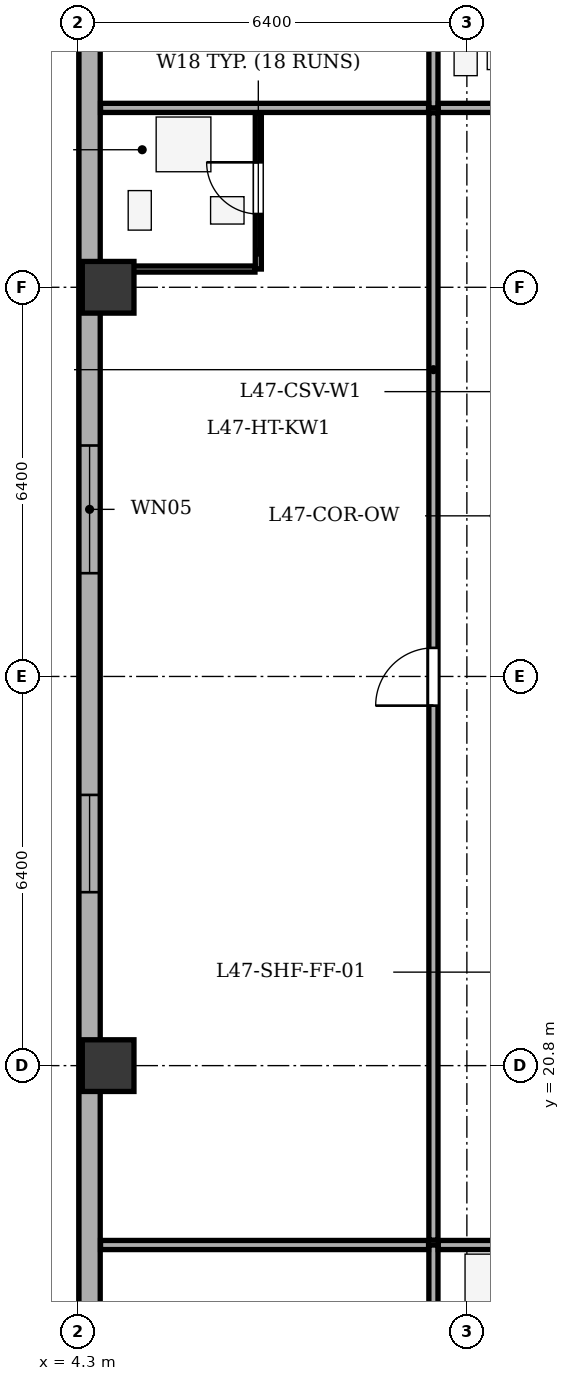
"""IFC4 building model, lengths in metres.
Left out: names, types, materials, properties, quantities, classifications, styles, units other than length and angle.
Written with IfcOpenShell. Run it as: python <this file> out.ifc"""

import sys

from ifc_helpers import new_model, si_unit, direction, frame, frame_2d, origin, origin_2d, place, context, subcontext, project, spatial, rectangle, extrude, element, fill, save


model = new_model("IFC4")
c1 = context("Model", 3, precision=1e-05, world=origin(), true_north=direction((0.0, 1.0)))
c2 = subcontext(c1, "Body", "Model", "MODEL_VIEW")
j1 = project(units=[si_unit("LENGTHUNIT", "METRE"), si_unit("PLANEANGLEUNIT", "RADIAN")], contexts=[c1])
p1 = place(None, origin())
s1 = spatial("IfcSite", under=j1, at=p1, CompositionType="ELEMENT")
p2 = place(p1, origin())
s2 = spatial("IfcBuilding", under=s1, at=p2, CompositionType="ELEMENT")
p3 = place(p2, frame((0.0, 0.0, 183.3)))
s3 = spatial("IfcBuildingStorey", under=s2, at=p3, CompositionType="ELEMENT", Elevation=183.3)
for number, where, z_axis, x_axis in (
    (1, (4.8, 20.8, 0.0), (0.0, 0.0, 1.0), (1.0, 0.0, 0.0)),
    (2, (4.8, 33.6, 0.0), (0.0, 0.0, 1.0), (1.0, 0.0, 0.0)),
):
    element("IfcColumn", number, at=place(p3, frame(where, z_axis=z_axis, x_axis=x_axis)), inside=s3, PredefinedType="COLUMN", context=c2, shape_type="SweptSolid", body=[
        extrude(rectangle(XDim=0.85, YDim=0.85, at=origin_2d()), origin(), (0.0, 0.0, 1.0), 3.5),
    ])
p4 = place(p3, frame((4.495, 12.9, 0.0), z_axis=(0.0, 0.0, 1.0), x_axis=(0.0, 1.0, 0.0)))
e3 = element("IfcWall", 3, at=p4, inside=s3, PredefinedType="STANDARD", context=c2, shape_type="SweptSolid", body=[
    extrude(rectangle(XDim=35.0, YDim=0.35, at=frame_2d((17.5, 0.0))), origin(), (0.0, 0.0, 1.0), 2.785),
])
p5 = place(p4, frame((1.813, 0.0, 0.75)))
e4 = element("IfcOpeningElement", 4, at=p5, cuts=e3, PredefinedType="OPENING", context=c2, shape_type="SweptSolid", body=[
    extrude(rectangle(XDim=1.6, YDim=1.75, at=frame_2d((0.8, 0.875))), frame((0.0, 0.185, 0.0), z_axis=(0.0, -1.0, 0.0), x_axis=(1.0, 0.0, 0.0)), (0.0, 0.0, 1.0), 0.37),
])
p6 = place(p4, frame((10.752, 0.0, 0.75)))
e5 = element("IfcOpeningElement", 5, at=p6, cuts=e3, PredefinedType="OPENING", context=c2, shape_type="SweptSolid", body=[
    extrude(rectangle(XDim=1.6, YDim=1.75, at=frame_2d((0.8, 0.875))), frame((0.0, 0.185, 0.0), z_axis=(0.0, -1.0, 0.0), x_axis=(1.0, 0.0, 0.0)), (0.0, 0.0, 1.0), 0.37),
])
p7 = place(p4, frame((15.998, 0.0, 0.75)))
e6 = element("IfcOpeningElement", 6, at=p7, cuts=e3, PredefinedType="OPENING", context=c2, shape_type="SweptSolid", body=[
    extrude(rectangle(XDim=2.1, YDim=1.75, at=frame_2d((1.05, 0.875))), frame((0.0, 0.185, 0.0), z_axis=(0.0, -1.0, 0.0), x_axis=(1.0, 0.0, 0.0)), (0.0, 0.0, 1.0), 0.37),
])
p8 = place(p4, frame((25.97, 0.0, 0.75)))
e7 = element("IfcOpeningElement", 7, at=p8, cuts=e3, PredefinedType="OPENING", context=c2, shape_type="SweptSolid", body=[
    extrude(rectangle(XDim=1.6, YDim=1.75, at=frame_2d((0.8, 0.875))), frame((0.0, 0.185, 0.0), z_axis=(0.0, -1.0, 0.0), x_axis=(1.0, 0.0, 0.0)), (0.0, 0.0, 1.0), 0.37),
])
p9 = place(p4, frame((30.555, 0.0, 0.75)))
e8 = element("IfcOpeningElement", 8, at=p9, cuts=e3, PredefinedType="OPENING", context=c2, shape_type="SweptSolid", body=[
    extrude(rectangle(XDim=2.1, YDim=1.75, at=frame_2d((1.05, 0.875))), frame((0.0, 0.185, 0.0), z_axis=(0.0, -1.0, 0.0), x_axis=(1.0, 0.0, 0.0)), (0.0, 0.0, 1.0), 0.37),
])
p10 = place(p3, frame((10.15, 8.275, 0.0), z_axis=(0.0, 0.0, 1.0), x_axis=(0.0, 1.0, 0.0)))
e9 = element("IfcWall", 9, at=p10, inside=s3, PredefinedType="PARTITIONING", context=c2, shape_type="SweptSolid", body=[
    extrude(rectangle(XDim=9.575, YDim=0.15, at=frame_2d((4.788, 0.0))), origin(), (0.0, 0.0, 1.0), 3.2),
])
p11 = place(p3, frame((10.23, 17.85, 0.0), z_axis=(0.0, 0.0, 1.0), x_axis=(1.0, 0.0, 0.0)))
e10 = element("IfcWall", 10, at=p11, inside=s3, PredefinedType="PARTITIONING", context=c2, shape_type="SweptSolid", body=[
    extrude(rectangle(XDim=1.82, YDim=0.15, at=frame_2d((0.91, 0.0))), origin(), (0.0, 0.0, 1.0), 3.2),
])
p12 = place(p3, frame((10.15, 36.55, 0.0), z_axis=(0.0, 0.0, 1.0), x_axis=(0.0, 1.0, 0.0)))
e11 = element("IfcWall", 11, at=p12, inside=s3, PredefinedType="PARTITIONING", context=c2, shape_type="SweptSolid", body=[
    extrude(rectangle(XDim=15.975, YDim=0.15, at=frame_2d((7.987, 0.0))), origin(), (0.0, 0.0, 1.0), 3.2),
])
p13 = place(p3, frame((10.23, 36.55, 0.0), z_axis=(0.0, 0.0, 1.0), x_axis=(1.0, 0.0, 0.0)))
e12 = element("IfcWall", 12, at=p13, inside=s3, PredefinedType="PARTITIONING", context=c2, shape_type="SweptSolid", body=[
    extrude(rectangle(XDim=1.57, YDim=0.15, at=frame_2d((0.785, 0.0))), origin(), (0.0, 0.0, 1.0), 3.2),
])
for number, where, z_axis, x_axis in (
    (13, (4.675, 17.85, 0.0), (0.0, 0.0, 1.0), (1.0, 0.0, 0.0)),
    (14, (4.675, 36.55, 0.0), (0.0, 0.0, 1.0), (1.0, 0.0, 0.0)),
):
    element("IfcWall", number, at=place(p3, frame(where, z_axis=z_axis, x_axis=x_axis)), inside=s3, PredefinedType="PARTITIONING", context=c2, shape_type="SweptSolid", body=[
        extrude(rectangle(XDim=5.395, YDim=0.15, at=frame_2d((2.698, 0.0))), origin(), (0.0, 0.0, 1.0), 3.2),
    ])
p14 = place(p3, frame((10.15, 17.93, 0.0), z_axis=(0.0, 0.0, 1.0), x_axis=(0.0, 1.0, 0.0)))
e15 = element("IfcWall", 15, at=p14, inside=s3, PredefinedType="PARTITIONING", context=c2, shape_type="SweptSolid", body=[
    extrude(rectangle(XDim=18.54, YDim=0.15, at=frame_2d((9.27, 0.0))), origin(), (0.0, 0.0, 1.0), 3.2),
])
p15 = place(p14, frame((8.79, 0.0, 0.0)))
e16 = element("IfcOpeningElement", 16, at=p15, cuts=e15, PredefinedType="OPENING", context=c2, shape_type="SweptSolid", body=[
    extrude(rectangle(XDim=0.95, YDim=2.1, at=frame_2d((0.475, 1.05))), frame((0.0, 0.085, 0.0), z_axis=(0.0, -1.0, 0.0), x_axis=(1.0, 0.0, 0.0)), (0.0, 0.0, 1.0), 0.17),
])
p16 = place(p3, frame((7.27, 33.9, 0.0), z_axis=(0.0, 0.0, 1.0), x_axis=(0.0, 1.0, 0.0)))
e17 = element("IfcWall", 17, at=p16, inside=s3, PredefinedType="PARTITIONING", context=c2, shape_type="SweptSolid", body=[
    extrude(rectangle(XDim=2.57, YDim=0.1, at=frame_2d((1.285, 0.0))), origin(), (0.0, 0.0, 1.0), 3.2),
])
p17 = place(p16, frame((0.905, 0.0, 0.0)))
e18 = element("IfcOpeningElement", 18, at=p17, cuts=e17, PredefinedType="OPENING", context=c2, shape_type="SweptSolid", body=[
    extrude(rectangle(XDim=0.85, YDim=2.05, at=frame_2d((0.425, 1.025))), frame((0.0, 0.06, 0.0), z_axis=(0.0, -1.0, 0.0), x_axis=(1.0, 0.0, 0.0)), (0.0, 0.0, 1.0), 0.12),
])
p18 = place(p3, frame((4.675, 33.9, 0.0), z_axis=(0.0, 0.0, 1.0), x_axis=(1.0, 0.0, 0.0)))
e19 = element("IfcWall", 19, at=p18, inside=s3, PredefinedType="PARTITIONING", context=c2, shape_type="SweptSolid", body=[
    extrude(rectangle(XDim=2.54, YDim=0.1, at=frame_2d((1.27, 0.0))), origin(), (0.0, 0.0, 1.0), 2.535),
])
p19 = place(p6, origin())
e20 = element("IfcWindow", 20, at=p19, inside=s3, PartitioningType="SINGLE_PANEL", PredefinedType="WINDOW", context=c2, shape_type="SweptSolid", body=[
    extrude(rectangle(XDim=1.6, YDim=1.75, at=frame_2d((0.8, 0.875))), frame((0.0, -0.01, 0.0), z_axis=(0.0, -1.0, 0.0), x_axis=(1.0, 0.0, 0.0)), (0.0, 0.0, 1.0), 0.06),
])
fill(e5, e20)
p20 = place(p7, origin())
e21 = element("IfcWindow", 21, at=p20, inside=s3, PartitioningType="SINGLE_PANEL", PredefinedType="WINDOW", context=c2, shape_type="SweptSolid", body=[
    extrude(rectangle(XDim=2.1, YDim=1.75, at=frame_2d((1.05, 0.875))), frame((0.0, -0.01, 0.0), z_axis=(0.0, -1.0, 0.0), x_axis=(1.0, 0.0, 0.0)), (0.0, 0.0, 1.0), 0.06),
])
fill(e6, e21)
p21 = place(p17, origin())
e22 = element("IfcDoor", 22, at=p21, inside=s3, OperationType="SINGLE_SWING_RIGHT", PredefinedType="DOOR", context=c2, shape_type="SweptSolid", body=[
    extrude(rectangle(XDim=0.85, YDim=2.05, at=frame_2d((0.425, 1.025))), frame((0.0, 0.025, 0.0), z_axis=(0.0, -1.0, 0.0), x_axis=(1.0, 0.0, 0.0)), (0.0, 0.0, 1.0), 0.05),
])
fill(e18, e22)
p22 = place(p15, origin())
e23 = element("IfcDoor", 23, at=p22, inside=s3, OperationType="SINGLE_SWING_LEFT", PredefinedType="DOOR", context=c2, shape_type="SweptSolid", body=[
    extrude(rectangle(XDim=0.95, YDim=2.1, at=frame_2d((0.475, 1.05))), frame((0.0, 0.025, 0.0), z_axis=(0.0, -1.0, 0.0), x_axis=(1.0, 0.0, 0.0)), (0.0, 0.0, 1.0), 0.05),
])
fill(e16, e23)
save(model, sys.argv[1])
